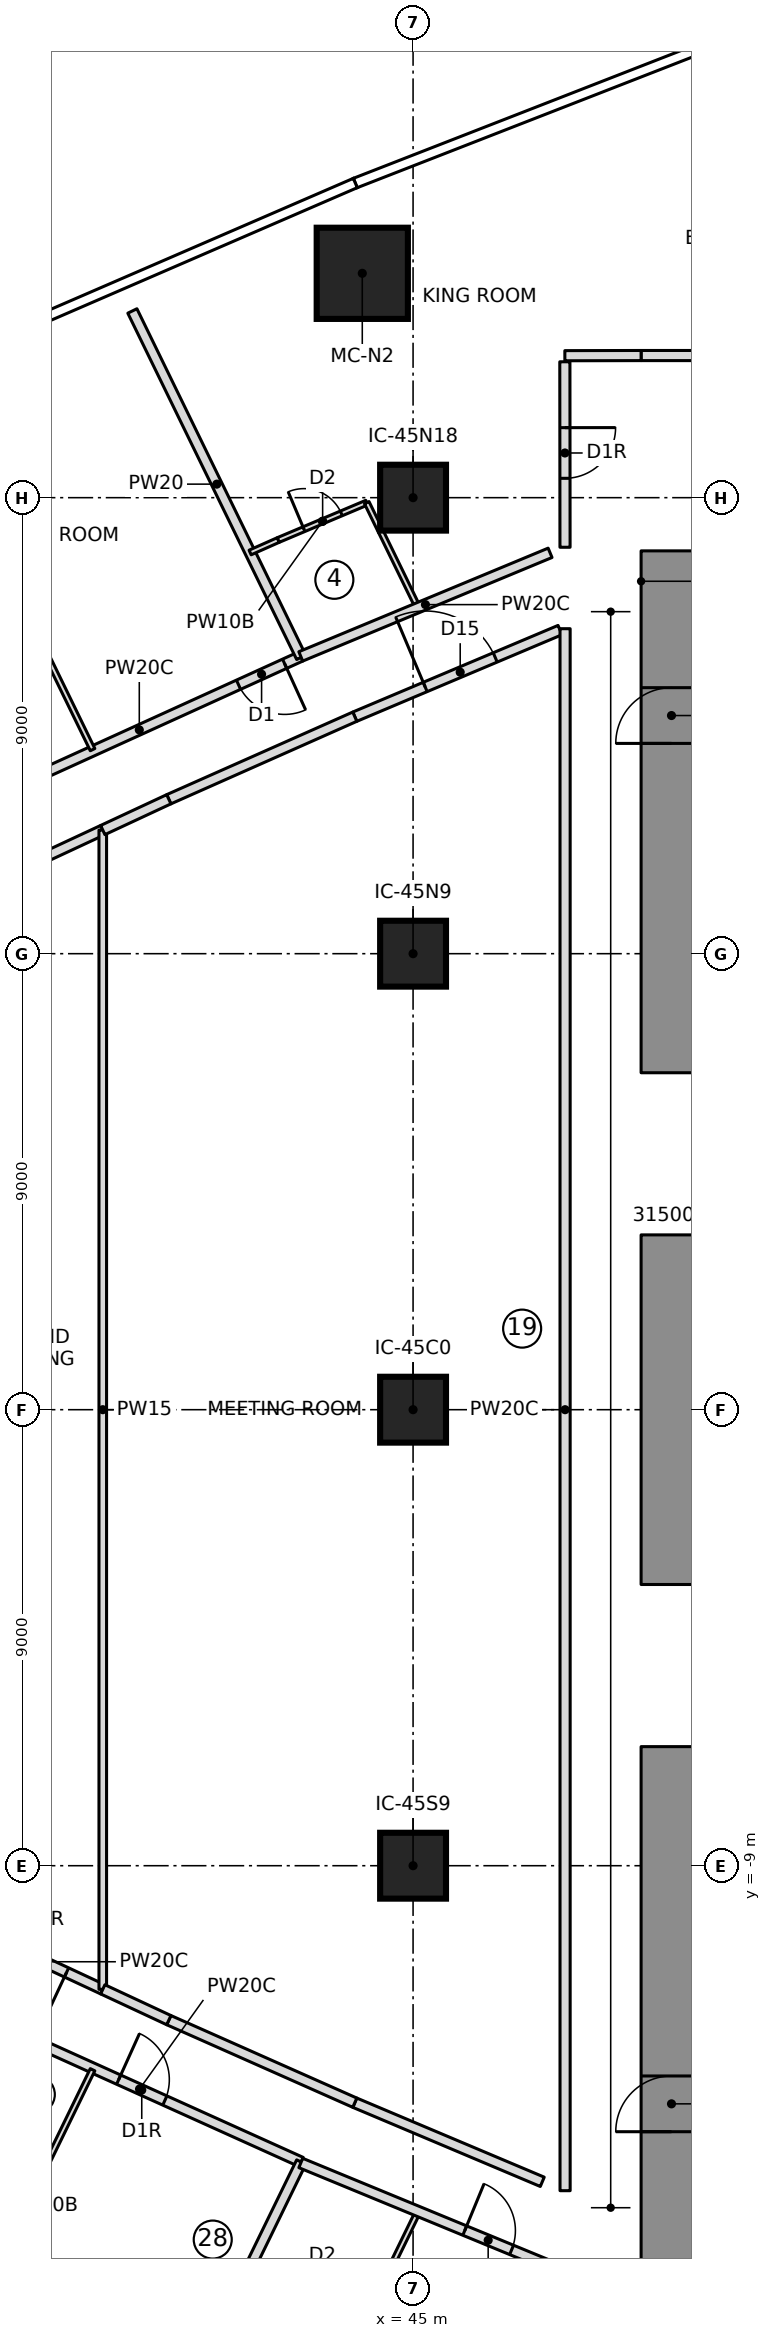
"""IFC4 building model, lengths in metres.
Left out: names, types, materials, properties, quantities, classifications, styles, units other than length and angle.
Written with IfcOpenShell. Run it as: python <this file> out.ifc"""

import sys

from ifc_helpers import new_model, si_unit, direction, frame, frame_2d, origin, origin_2d, place, context, subcontext, project, spatial, rectangle, extrude, element, fill, save


model = new_model("IFC4")
c1 = context("Model", 3, precision=1e-05, world=origin(), true_north=direction((0.0, 1.0)))
c2 = subcontext(c1, "Body", "Model", "MODEL_VIEW")
j1 = project(units=[si_unit("LENGTHUNIT", "METRE"), si_unit("PLANEANGLEUNIT", "RADIAN")], contexts=[c1])
p1 = place(None, origin())
s1 = spatial("IfcSite", under=j1, at=p1, CompositionType="ELEMENT")
p2 = place(p1, origin())
s2 = spatial("IfcBuilding", under=s1, at=p2, CompositionType="ELEMENT")
p3 = place(p2, frame((0.0, 0.0, 71.55)))
s3 = spatial("IfcBuildingStorey", under=s2, at=p3, CompositionType="ELEMENT", Elevation=71.55)
p4 = place(p3, frame((50.1, 6.65, 0.0), z_axis=(0.0, 0.0, 1.0), x_axis=(0.0, 1.0, 0.0)))
e1 = element("IfcWall", 1, at=p4, inside=s3, PredefinedType="SHEAR", context=c2, shape_type="SweptSolid", body=[
    extrude(rectangle(XDim=10.3, YDim=1.2, at=frame_2d((5.15, 0.0))), origin(), (0.0, 0.0, 1.0), 3.55),
])
p5 = place(p4, frame((6.5, 0.0, 0.0)))
e2 = element("IfcOpeningElement", 2, at=p5, cuts=e1, PredefinedType="OPENING", context=c2, shape_type="SweptSolid", body=[
    extrude(rectangle(XDim=1.1, YDim=2.1, at=frame_2d((0.55, 1.05))), frame((0.0, 0.61, 0.0), z_axis=(0.0, -1.0, 0.0), x_axis=(1.0, 0.0, 0.0)), (0.0, 0.0, 1.0), 1.22),
])
p6 = place(p3, frame((50.1, -3.45, 0.0), z_axis=(0.0, 0.0, 1.0), x_axis=(0.0, 1.0, 0.0)))
e3 = element("IfcWall", 3, at=p6, inside=s3, PredefinedType="SHEAR", context=c2, shape_type="SweptSolid", body=[
    extrude(rectangle(XDim=6.9, YDim=1.2, at=frame_2d((3.45, 0.0))), origin(), (0.0, 0.0, 1.0), 3.55),
])
p7 = place(p3, frame((50.1, -16.95, 0.0), z_axis=(0.0, 0.0, 1.0), x_axis=(0.0, 1.0, 0.0)))
e4 = element("IfcWall", 4, at=p7, inside=s3, PredefinedType="SHEAR", context=c2, shape_type="SweptSolid", body=[
    extrude(rectangle(XDim=10.3, YDim=1.2, at=frame_2d((5.15, 0.0))), origin(), (0.0, 0.0, 1.0), 3.55),
])
p8 = place(p7, frame((2.7, 0.0, 0.0)))
e5 = element("IfcOpeningElement", 5, at=p8, cuts=e4, PredefinedType="OPENING", context=c2, shape_type="SweptSolid", body=[
    extrude(rectangle(XDim=1.1, YDim=2.1, at=frame_2d((0.55, 1.05))), frame((0.0, 0.61, 0.0), z_axis=(0.0, -1.0, 0.0), x_axis=(1.0, 0.0, 0.0)), (0.0, 0.0, 1.0), 1.22),
])
p9 = place(p3, frame((43.998, 22.428, 0.0), z_axis=(0.0, 0.0, 1.0), x_axis=(1.0, 0.0, 0.0)))
e6 = element("IfcColumn", 6, at=p9, inside=s3, PredefinedType="COLUMN", context=c2, shape_type="SweptSolid", body=[
    extrude(rectangle(XDim=1.8, YDim=1.8, at=origin_2d()), origin(), (0.0, 0.0, 1.0), 3.55),
])
for number, where, z_axis, x_axis in (
    (7, (45.0, -9.0, 0.0), (0.0, 0.0, 1.0), (1.0, 0.0, 0.0)),
    (8, (45.0, 0.0, 0.0), (0.0, 0.0, 1.0), (1.0, 0.0, 0.0)),
    (9, (45.0, 9.0, 0.0), (0.0, 0.0, 1.0), (1.0, 0.0, 0.0)),
    (10, (45.0, 18.0, 0.0), (0.0, 0.0, 1.0), (1.0, 0.0, 0.0)),
):
    element("IfcColumn", number, at=place(p3, frame(where, z_axis=z_axis, x_axis=x_axis)), inside=s3, PredefinedType="COLUMN", context=c2, shape_type="SweptSolid", body=[
        extrude(rectangle(XDim=1.3, YDim=1.3, at=origin_2d()), origin(), (0.0, 0.0, 1.0), 3.55),
    ])
p10 = place(p3, frame((42.784, 14.867, 0.0), z_axis=(0.0, 0.0, 1.0), x_axis=(-0.910238677692, -0.414083988622, 0.0)))
e11 = element("IfcWall", 11, at=p10, inside=s3, PredefinedType="PARTITIONING", context=c2, shape_type="SweptSolid", body=[
    extrude(rectangle(XDim=7.003, YDim=0.2, at=frame_2d((3.501, 0.0))), origin(), (0.0, 0.0, 1.0), 3.15),
])
p11 = place(p10, frame((0.35, 0.0, 0.0)))
e12 = element("IfcOpeningElement", 12, at=p11, cuts=e11, PredefinedType="OPENING", context=c2, shape_type="SweptSolid", body=[
    extrude(rectangle(XDim=1.0, YDim=2.1, at=frame_2d((0.5, 1.05))), frame((0.0, 0.11, 0.0), z_axis=(0.0, -1.0, 0.0), x_axis=(1.0, 0.0, 0.0)), (0.0, 0.0, 1.0), 0.22),
])
p12 = place(p3, frame((37.677, 15.073, 0.0), z_axis=(0.0, 0.0, 1.0), x_axis=(0.43818492173, -0.89888485045, 0.0)))
e13 = element("IfcWall", 13, at=p12, inside=s3, PredefinedType="PARTITIONING", context=c2, shape_type="SweptSolid", body=[
    extrude(rectangle(XDim=2.277, YDim=0.1, at=frame_2d((1.139, 0.0))), origin(), (0.0, 0.0, 1.0), 3.15),
])
p13 = place(p3, frame((42.793, 14.849, 0.0), z_axis=(0.0, 0.0, 1.0), x_axis=(-0.438214892445, 0.898870239823, 0.0)))
e14 = element("IfcWall", 14, at=p13, inside=s3, PredefinedType="PARTITIONING", context=c2, shape_type="SweptSolid", body=[
    extrude(rectangle(XDim=7.605, YDim=0.2, at=frame_2d((3.802, 0.0))), origin(), (0.0, 0.0, 1.0), 3.15),
])
p14 = place(p3, frame((41.784, 16.918, 0.0), z_axis=(0.0, 0.0, 1.0), x_axis=(0.913894320415, 0.405952178357, 0.0)))
e15 = element("IfcWall", 15, at=p14, inside=s3, PredefinedType="PARTITIONING", context=c2, shape_type="SweptSolid", body=[
    extrude(rectangle(XDim=0.608, YDim=0.1, at=frame_2d((0.304, 0.0))), origin(), (0.0, 0.0, 1.0), 3.15),
])
p15 = place(p3, frame((42.34, 17.165, 0.0), z_axis=(0.0, 0.0, 1.0), x_axis=(0.921263923232, 0.38893802045, 0.0)))
e16 = element("IfcWall", 16, at=p15, inside=s3, PredefinedType="PARTITIONING", context=c2, shape_type="SweptSolid", body=[
    extrude(rectangle(XDim=1.895, YDim=0.1, at=frame_2d((0.948, 0.0))), origin(), (0.0, 0.0, 1.0), 3.15),
])
p16 = place(p15, frame((0.55, 0.0, 0.0)))
e17 = element("IfcOpeningElement", 17, at=p16, cuts=e16, PredefinedType="OPENING", context=c2, shape_type="SweptSolid", body=[
    extrude(rectangle(XDim=0.8, YDim=2.1, at=frame_2d((0.4, 1.05))), frame((0.0, 0.06, 0.0), z_axis=(0.0, -1.0, 0.0), x_axis=(1.0, 0.0, 0.0)), (0.0, 0.0, 1.0), 0.12),
])
p17 = place(p3, frame((44.086, 17.902, 0.0), z_axis=(0.0, 0.0, 1.0), x_axis=(0.438279975423, -0.898838507822, 0.0)))
e18 = element("IfcWall", 18, at=p17, inside=s3, PredefinedType="PARTITIONING", context=c2, shape_type="SweptSolid", body=[
    extrude(rectangle(XDim=0.603, YDim=0.1, at=frame_2d((0.301, 0.0))), origin(), (0.0, 0.0, 1.0), 3.15),
])
p18 = place(p3, frame((44.355, 17.35, 0.0), z_axis=(0.0, 0.0, 1.0), x_axis=(0.438227394636, -0.89886414468, 0.0)))
e19 = element("IfcWall", 19, at=p18, inside=s3, PredefinedType="PARTITIONING", context=c2, shape_type="SweptSolid", body=[
    extrude(rectangle(XDim=1.667, YDim=0.1, at=frame_2d((0.833, 0.0))), origin(), (0.0, 0.0, 1.0), 3.15),
])
p19 = place(p3, frame((36.41, -11.968, 0.0), z_axis=(0.0, 0.0, 1.0), x_axis=(0.911422478094, -0.411471829443, 0.0)))
e20 = element("IfcWall", 20, at=p19, inside=s3, PredefinedType="PARTITIONING", context=c2, shape_type="SweptSolid", body=[
    extrude(rectangle(XDim=7.003, YDim=0.2, at=frame_2d((3.501, 0.0))), origin(), (0.0, 0.0, 1.0), 3.15),
])
p20 = place(p19, frame((3.05, 0.0, 0.0)))
e21 = element("IfcOpeningElement", 21, at=p20, cuts=e20, PredefinedType="OPENING", context=c2, shape_type="SweptSolid", body=[
    extrude(rectangle(XDim=1.0, YDim=2.1, at=frame_2d((0.5, 1.05))), frame((0.0, 0.11, 0.0), z_axis=(0.0, -1.0, 0.0), x_axis=(1.0, 0.0, 0.0)), (0.0, 0.0, 1.0), 0.22),
])
p21 = place(p3, frame((38.675, -13.027, 0.0), z_axis=(0.0, 0.0, 1.0), x_axis=(-0.43818492173, -0.89888485045, 0.0)))
e22 = element("IfcWall", 22, at=p21, inside=s3, PredefinedType="PARTITIONING", context=c2, shape_type="SweptSolid", body=[
    extrude(rectangle(XDim=2.277, YDim=0.1, at=frame_2d((1.139, 0.0))), origin(), (0.0, 0.0, 1.0), 3.15),
])
p22 = place(p3, frame((39.46, -21.685, 0.0), z_axis=(0.0, 0.0, 1.0), x_axis=(0.438214892445, 0.898870239823, 0.0)))
e23 = element("IfcWall", 23, at=p22, inside=s3, PredefinedType="PARTITIONING", context=c2, shape_type="SweptSolid", body=[
    extrude(rectangle(XDim=7.605, YDim=0.2, at=frame_2d((3.802, 0.0))), origin(), (0.0, 0.0, 1.0), 3.15),
])
p23 = place(p3, frame((45.085, -15.852, 0.0), z_axis=(0.0, 0.0, 1.0), x_axis=(-0.438227394636, -0.89886414468, 0.0)))
e24 = element("IfcWall", 24, at=p23, inside=s3, PredefinedType="PARTITIONING", context=c2, shape_type="SweptSolid", body=[
    extrude(rectangle(XDim=1.667, YDim=0.1, at=frame_2d((0.833, 0.0))), origin(), (0.0, 0.0, 1.0), 3.15),
])
p24 = place(p3, frame((38.876, -11.44, 0.0), z_axis=(0.0, 0.0, 1.0), x_axis=(-0.906347616376, 0.422532836937, 0.0)))
e25 = element("IfcWall", 25, at=p24, inside=s3, PredefinedType="PARTITIONING", context=c2, shape_type="SweptSolid", body=[
    extrude(rectangle(XDim=2.578, YDim=0.2, at=frame_2d((1.289, 0.0))), origin(), (0.0, 0.0, 1.0), 3.15),
])
p25 = place(p24, frame((0.789, 0.0, 0.0)))
e26 = element("IfcOpeningElement", 26, at=p25, cuts=e25, PredefinedType="OPENING", context=c2, shape_type="SweptSolid", body=[
    extrude(rectangle(XDim=1.0, YDim=2.1, at=frame_2d((0.5, 1.05))), frame((0.0, 0.11, 0.0), z_axis=(0.0, -1.0, 0.0), x_axis=(1.0, 0.0, 0.0)), (0.0, 0.0, 1.0), 0.22),
])
p26 = place(p3, frame((36.54, 10.351, 0.0), z_axis=(0.0, 0.0, 1.0), x_axis=(0.906347616376, 0.422532836937, 0.0)))
e27 = element("IfcWall", 27, at=p26, inside=s3, PredefinedType="PARTITIONING", context=c2, shape_type="SweptSolid", body=[
    extrude(rectangle(XDim=2.578, YDim=0.2, at=frame_2d((1.289, 0.0))), origin(), (0.0, 0.0, 1.0), 3.15),
])
p27 = place(p3, frame((38.876, -11.44, 0.0), z_axis=(0.0, 0.0, 1.0), x_axis=(0.0, 1.0, 0.0)))
e28 = element("IfcWall", 28, at=p27, inside=s3, PredefinedType="PARTITIONING", context=c2, shape_type="SweptSolid", body=[
    extrude(rectangle(XDim=22.88, YDim=0.15, at=frame_2d((11.44, 0.0))), origin(), (0.0, 0.0, 1.0), 3.15),
])
p28 = place(p3, frame((43.85, 13.677, 0.0), z_axis=(0.0, 0.0, 1.0), x_axis=(0.921265924084, 0.388933281068, 0.0)))
e29 = element("IfcWall", 29, at=p28, inside=s3, PredefinedType="PARTITIONING", context=c2, shape_type="SweptSolid", body=[
    extrude(rectangle(XDim=4.396, YDim=0.2, at=frame_2d((2.198, 0.0))), origin(), (0.0, 0.0, 1.0), 3.15),
])
p29 = place(p28, frame((1.508, 0.0, 0.0)))
e30 = element("IfcOpeningElement", 30, at=p29, cuts=e29, PredefinedType="OPENING", context=c2, shape_type="SweptSolid", body=[
    extrude(rectangle(XDim=1.5, YDim=2.1, at=frame_2d((0.75, 1.05))), frame((0.0, 0.11, 0.0), z_axis=(0.0, -1.0, 0.0), x_axis=(1.0, 0.0, 0.0)), (0.0, 0.0, 1.0), 0.22),
])
p30 = place(p3, frame((40.18, 12.048, 0.0), z_axis=(0.0, 0.0, 1.0), x_axis=(0.913986953061, 0.405743576209, 0.0)))
e31 = element("IfcWall", 31, at=p30, inside=s3, PredefinedType="PARTITIONING", context=c2, shape_type="SweptSolid", body=[
    extrude(rectangle(XDim=4.016, YDim=0.2, at=frame_2d((2.008, 0.0))), origin(), (0.0, 0.0, 1.0), 3.15),
])
p31 = place(p3, frame((47.55, -15.239, 0.0), z_axis=(0.0, 0.0, 1.0), x_axis=(-0.921269894054, 0.388923877269, 0.0)))
e32 = element("IfcWall", 32, at=p31, inside=s3, PredefinedType="PARTITIONING", context=c2, shape_type="SweptSolid", body=[
    extrude(rectangle(XDim=4.016, YDim=0.2, at=frame_2d((2.008, 0.0))), origin(), (0.0, 0.0, 1.0), 3.15),
])
p32 = place(p3, frame((43.85, -13.677, 0.0), z_axis=(0.0, 0.0, 1.0), x_axis=(-0.913986953061, 0.405743576209, 0.0)))
e33 = element("IfcWall", 33, at=p32, inside=s3, PredefinedType="PARTITIONING", context=c2, shape_type="SweptSolid", body=[
    extrude(rectangle(XDim=4.016, YDim=0.2, at=frame_2d((2.008, 0.0))), origin(), (0.0, 0.0, 1.0), 3.15),
])
for number, where, z_axis, x_axis in (
    (34, (40.18, -12.048, 0.0), (0.0, 0.0, 1.0), (-0.906, 0.423, 0.0)),
    (35, (38.876, 11.44, 0.0), (0.0, 0.0, 1.0), (0.906, 0.423, 0.0)),
):
    element("IfcWall", number, at=place(p3, frame(where, z_axis=z_axis, x_axis=x_axis)), inside=s3, PredefinedType="PARTITIONING", context=c2, shape_type="SweptSolid", body=[
        extrude(rectangle(XDim=1.438, YDim=0.2, at=frame_2d((0.719, 0.0))), origin(), (0.0, 0.0, 1.0), 3.15),
    ])
p33 = place(p3, frame((54.597, 20.805, 0.0), z_axis=(0.0, 0.0, 1.0), x_axis=(-1.0, 0.0, 0.0)))
e36 = element("IfcWall", 36, at=p33, inside=s3, PredefinedType="PARTITIONING", context=c2, shape_type="SweptSolid", body=[
    extrude(rectangle(XDim=5.097, YDim=0.2, at=frame_2d((2.548, 0.0))), origin(), (0.0, 0.0, 1.0), 3.15),
])
p34 = place(p33, frame((2.048, 0.0, 0.0)))
e37 = element("IfcOpeningElement", 37, at=p34, cuts=e36, PredefinedType="OPENING", context=c2, shape_type="SweptSolid", body=[
    extrude(rectangle(XDim=1.5, YDim=2.1, at=frame_2d((0.75, 1.05))), frame((0.0, 0.11, 0.0), z_axis=(0.0, -1.0, 0.0), x_axis=(1.0, 0.0, 0.0)), (0.0, 0.0, 1.0), 0.22),
])
p35 = place(p3, frame((47.704, 16.911, 0.0), z_axis=(0.0, 0.0, 1.0), x_axis=(-0.923461497361, -0.383691103484, 0.0)))
e38 = element("IfcWall", 38, at=p35, inside=s3, PredefinedType="PARTITIONING", context=c2, shape_type="SweptSolid", body=[
    extrude(rectangle(XDim=5.328, YDim=0.2, at=frame_2d((2.664, 0.0))), origin(), (0.0, 0.0, 1.0), 3.15),
])
p36 = place(p3, frame((42.784, -14.867, 0.0), z_axis=(0.0, 0.0, 1.0), x_axis=(0.92451459323, -0.381146647507, 0.0)))
e39 = element("IfcWall", 39, at=p36, inside=s3, PredefinedType="PARTITIONING", context=c2, shape_type="SweptSolid", body=[
    extrude(rectangle(XDim=5.322, YDim=0.2, at=frame_2d((2.661, 0.0))), origin(), (0.0, 0.0, 1.0), 3.15),
])
p37 = place(p36, frame((3.5, 0.0, 0.0)))
e40 = element("IfcOpeningElement", 40, at=p37, cuts=e39, PredefinedType="OPENING", context=c2, shape_type="SweptSolid", body=[
    extrude(rectangle(XDim=1.0, YDim=2.1, at=frame_2d((0.5, 1.05))), frame((0.0, 0.11, 0.0), z_axis=(0.0, -1.0, 0.0), x_axis=(1.0, 0.0, 0.0)), (0.0, 0.0, 1.0), 0.22),
])
p38 = place(p3, frame((48.0, 15.414, 0.0), z_axis=(0.0, 0.0, 1.0), x_axis=(0.0, -1.0, 0.0)))
e41 = element("IfcWall", 41, at=p38, inside=s3, PredefinedType="PARTITIONING", context=c2, shape_type="SweptSolid", body=[
    extrude(rectangle(XDim=30.828, YDim=0.2, at=frame_2d((15.414, 0.0))), origin(), (0.0, 0.0, 1.0), 3.15),
])
p39 = place(p3, frame((49.5, 20.805, 0.0), z_axis=(0.0, 0.0, 1.0), x_axis=(-0.999998104399, -0.001947099992, 0.0)))
e42 = element("IfcWall", 42, at=p39, inside=s3, PredefinedType="PARTITIONING", context=c2, shape_type="SweptSolid", body=[
    extrude(rectangle(XDim=1.505, YDim=0.2, at=frame_2d((0.752, 0.0))), origin(), (0.0, 0.0, 1.0), 3.15),
])
p40 = place(p3, frame((47.996, 20.682, 0.0), z_axis=(0.0, 0.0, 1.0), x_axis=(0.000866955326, -0.999999624194, 0.0)))
e43 = element("IfcWall", 43, at=p40, inside=s3, PredefinedType="PARTITIONING", context=c2, shape_type="SweptSolid", body=[
    extrude(rectangle(XDim=3.661, YDim=0.2, at=frame_2d((1.831, 0.0))), origin(), (0.0, 0.0, 1.0), 3.15),
])
p41 = place(p40, frame((1.3, 0.0, 0.0)))
e44 = element("IfcOpeningElement", 44, at=p41, cuts=e43, PredefinedType="OPENING", context=c2, shape_type="SweptSolid", body=[
    extrude(rectangle(XDim=1.0, YDim=2.1, at=frame_2d((0.5, 1.05))), frame((0.0, 0.11, 0.0), z_axis=(0.0, -1.0, 0.0), x_axis=(1.0, 0.0, 0.0)), (0.0, 0.0, 1.0), 0.22),
])
p42 = place(p11, origin())
e45 = element("IfcDoor", 45, at=p42, inside=s3, OperationType="SINGLE_SWING_LEFT", PredefinedType="DOOR", context=c2, shape_type="SweptSolid", body=[
    extrude(rectangle(XDim=1.0, YDim=2.1, at=frame_2d((0.5, 1.05))), frame((0.0, 0.025, 0.0), z_axis=(0.0, -1.0, 0.0), x_axis=(1.0, 0.0, 0.0)), (0.0, 0.0, 1.0), 0.05),
])
fill(e12, e45)
p43 = place(p16, origin())
e46 = element("IfcDoor", 46, at=p43, inside=s3, OperationType="SINGLE_SWING_LEFT", PredefinedType="DOOR", context=c2, shape_type="SweptSolid", body=[
    extrude(rectangle(XDim=0.8, YDim=2.1, at=frame_2d((0.4, 1.05))), frame((0.0, 0.025, 0.0), z_axis=(0.0, -1.0, 0.0), x_axis=(1.0, 0.0, 0.0)), (0.0, 0.0, 1.0), 0.05),
])
fill(e17, e46)
p44 = place(p20, origin())
e47 = element("IfcDoor", 47, at=p44, inside=s3, OperationType="SINGLE_SWING_RIGHT", PredefinedType="DOOR", context=c2, shape_type="SweptSolid", body=[
    extrude(rectangle(XDim=1.0, YDim=2.1, at=frame_2d((0.5, 1.05))), frame((0.0, 0.025, 0.0), z_axis=(0.0, -1.0, 0.0), x_axis=(1.0, 0.0, 0.0)), (0.0, 0.0, 1.0), 0.05),
])
fill(e21, e47)
p45 = place(p37, origin())
e48 = element("IfcDoor", 48, at=p45, inside=s3, OperationType="SINGLE_SWING_RIGHT", PredefinedType="DOOR", context=c2, shape_type="SweptSolid", body=[
    extrude(rectangle(XDim=1.0, YDim=2.1, at=frame_2d((0.5, 1.05))), frame((0.0, 0.025, 0.0), z_axis=(0.0, -1.0, 0.0), x_axis=(1.0, 0.0, 0.0)), (0.0, 0.0, 1.0), 0.05),
])
fill(e40, e48)
p46 = place(p25, origin())
e49 = element("IfcDoor", 49, at=p46, inside=s3, OperationType="SINGLE_SWING_RIGHT", PredefinedType="DOOR", context=c2, shape_type="SweptSolid", body=[
    extrude(rectangle(XDim=1.0, YDim=2.1, at=frame_2d((0.5, 1.05))), frame((0.0, 0.025, 0.0), z_axis=(0.0, -1.0, 0.0), x_axis=(1.0, 0.0, 0.0)), (0.0, 0.0, 1.0), 0.05),
])
fill(e26, e49)
p47 = place(p29, origin())
e50 = element("IfcDoor", 50, at=p47, inside=s3, OperationType="DOUBLE_DOOR_SINGLE_SWING", PredefinedType="DOOR", context=c2, shape_type="SweptSolid", body=[
    extrude(rectangle(XDim=1.5, YDim=2.1, at=frame_2d((0.75, 1.05))), frame((0.0, 0.025, 0.0), z_axis=(0.0, -1.0, 0.0), x_axis=(1.0, 0.0, 0.0)), (0.0, 0.0, 1.0), 0.05),
])
fill(e30, e50)
p48 = place(p41, origin())
e51 = element("IfcDoor", 51, at=p48, inside=s3, OperationType="SINGLE_SWING_RIGHT", PredefinedType="DOOR", context=c2, shape_type="SweptSolid", body=[
    extrude(rectangle(XDim=1.0, YDim=2.1, at=frame_2d((0.5, 1.05))), frame((0.0, 0.025, 0.0), z_axis=(0.0, -1.0, 0.0), x_axis=(1.0, 0.0, 0.0)), (0.0, 0.0, 1.0), 0.05),
])
fill(e44, e51)
p49 = place(p5, origin())
e52 = element("IfcDoor", 52, at=p49, inside=s3, OperationType="SINGLE_SWING_RIGHT", PredefinedType="DOOR", context=c2, shape_type="SweptSolid", body=[
    extrude(rectangle(XDim=1.1, YDim=2.1, at=frame_2d((0.55, 1.05))), frame((0.0, 0.025, 0.0), z_axis=(0.0, -1.0, 0.0), x_axis=(1.0, 0.0, 0.0)), (0.0, 0.0, 1.0), 0.05),
])
fill(e2, e52)
p50 = place(p8, origin())
e53 = element("IfcDoor", 53, at=p50, inside=s3, OperationType="SINGLE_SWING_RIGHT", PredefinedType="DOOR", context=c2, shape_type="SweptSolid", body=[
    extrude(rectangle(XDim=1.1, YDim=2.1, at=frame_2d((0.55, 1.05))), frame((0.0, 0.025, 0.0), z_axis=(0.0, -1.0, 0.0), x_axis=(1.0, 0.0, 0.0)), (0.0, 0.0, 1.0), 0.05),
])
fill(e5, e53)
save(model, sys.argv[1])
